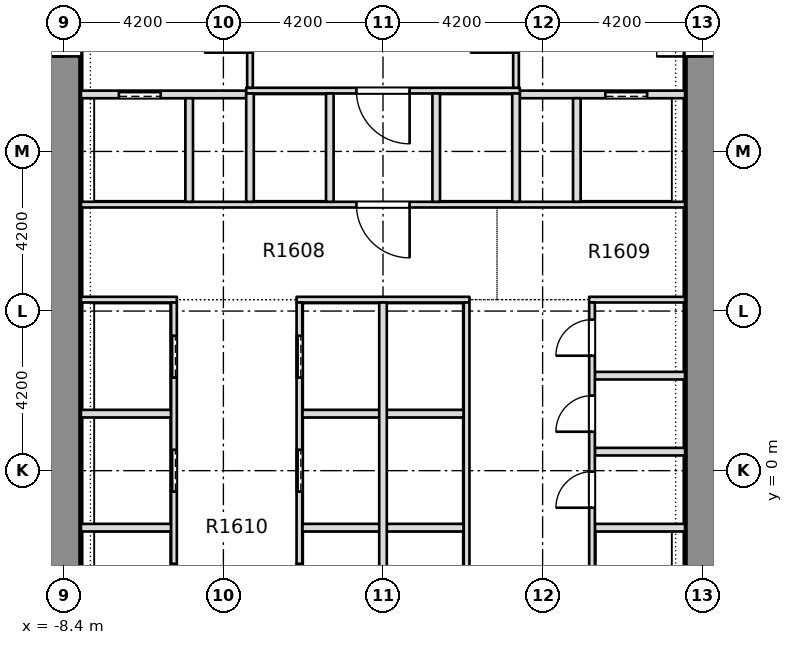
"""IFC4 building model, lengths in metres.
Left out: names, types, materials, properties, quantities, classifications, styles, units other than length and angle.
Written with IfcOpenShell. Run it as: python <this file> out.ifc"""

import sys

from ifc_helpers import new_model, si_unit, direction, frame, frame_2d, origin, place, context, subcontext, project, spatial, rectangle, extrude, element, fill, save


model = new_model("IFC4")
c1 = context("Model", 3, precision=1e-05, world=origin(), true_north=direction((0.0, 1.0)))
c2 = subcontext(c1, "Body", "Model", "MODEL_VIEW")
j1 = project(units=[si_unit("LENGTHUNIT", "METRE"), si_unit("PLANEANGLEUNIT", "RADIAN")], contexts=[c1])
p1 = place(None, origin())
s1 = spatial("IfcSite", under=j1, at=p1, CompositionType="ELEMENT")
p2 = place(p1, origin())
s2 = spatial("IfcBuilding", under=s1, at=p2, CompositionType="ELEMENT")
p3 = place(p2, frame((0.0, 0.0, 69.0)))
s3 = spatial("IfcBuildingStorey", under=s2, at=p3, CompositionType="ELEMENT", Elevation=69.0)
p4 = place(p3, frame((-8.4, -7.5, -0.32), z_axis=(0.0, 0.0, 1.0), x_axis=(0.0, 1.0, 0.0)))
e1 = element("IfcWall", 1, at=p4, inside=s3, PredefinedType="SHEAR", context=c2, shape_type="SweptSolid", body=[
    extrude(rectangle(XDim=28.35, YDim=0.9, at=frame_2d((14.175, 0.0))), origin(), (0.0, 0.0, 1.0), 3.45),
])
p5 = place(p4, frame((18.4, 0.0, 0.32)))
e2 = element("IfcOpeningElement", 2, at=p5, cuts=e1, PredefinedType="OPENING", context=c2, shape_type="SweptSolid", body=[
    extrude(rectangle(XDim=1.2, YDim=2.1, at=frame_2d((0.6, 1.05))), frame((0.0, 0.46, 0.0), z_axis=(0.0, -1.0, 0.0), x_axis=(1.0, 0.0, 0.0)), (0.0, 0.0, 1.0), 0.92),
])
p6 = place(p3, frame((8.4, -7.5, -0.32), z_axis=(0.0, 0.0, 1.0), x_axis=(0.0, 1.0, 0.0)))
e3 = element("IfcWall", 3, at=p6, inside=s3, PredefinedType="SHEAR", context=c2, shape_type="SweptSolid", body=[
    extrude(rectangle(XDim=28.35, YDim=0.9, at=frame_2d((14.175, 0.0))), origin(), (0.0, 0.0, 1.0), 3.45),
])
p7 = place(p6, frame((18.4, 0.0, 0.32)))
e4 = element("IfcOpeningElement", 4, at=p7, cuts=e3, PredefinedType="OPENING", context=c2, shape_type="SweptSolid", body=[
    extrude(rectangle(XDim=1.2, YDim=2.1, at=frame_2d((0.6, 1.05))), frame((0.0, 0.46, 0.0), z_axis=(0.0, -1.0, 0.0), x_axis=(1.0, 0.0, 0.0)), (0.0, 0.0, 1.0), 0.92),
])
p8 = place(p3, frame((-7.949, -1.5, 0.0), z_axis=(0.0, 0.0, 1.0), x_axis=(1.0, 0.0, 0.0)))
e5 = element("IfcWall", 5, at=p8, inside=s3, PredefinedType="PARTITIONING", context=c2, shape_type="SweptSolid", body=[
    extrude(rectangle(XDim=2.374, YDim=0.2, at=frame_2d((1.187, 0.0))), origin(), (0.0, 0.0, 1.0), 3.13),
])
p9 = place(p3, frame((-2.125, -1.5, 0.0), z_axis=(0.0, 0.0, 1.0), x_axis=(1.0, 0.0, 0.0)))
e6 = element("IfcWall", 6, at=p9, inside=s3, PredefinedType="PARTITIONING", context=c2, shape_type="SweptSolid", body=[
    extrude(rectangle(XDim=4.25, YDim=0.2, at=frame_2d((2.125, 0.0))), origin(), (0.0, 0.0, 1.0), 3.13),
])
for number, where, z_axis, x_axis in (
    (7, (5.575, -1.5, 0.0), (0.0, 0.0, 1.0), (1.0, 0.0, 0.0)),
    (8, (5.575, 0.5, 0.0), (0.0, 0.0, 1.0), (1.0, 0.0, 0.0)),
    (9, (-7.949, 1.5, 0.0), (0.0, 0.0, 1.0), (1.0, 0.0, 0.0)),
):
    element("IfcWall", number, at=place(p3, frame(where, z_axis=z_axis, x_axis=x_axis)), inside=s3, PredefinedType="PARTITIONING", context=c2, shape_type="SweptSolid", body=[
        extrude(rectangle(XDim=2.374, YDim=0.2, at=frame_2d((1.187, 0.0))), origin(), (0.0, 0.0, 1.0), 3.13),
    ])
p10 = place(p3, frame((-2.125, 1.5, 0.0), z_axis=(0.0, 0.0, 1.0), x_axis=(1.0, 0.0, 0.0)))
e10 = element("IfcWall", 10, at=p10, inside=s3, PredefinedType="PARTITIONING", context=c2, shape_type="SweptSolid", body=[
    extrude(rectangle(XDim=4.25, YDim=0.2, at=frame_2d((2.125, 0.0))), origin(), (0.0, 0.0, 1.0), 3.13),
])
p11 = place(p3, frame((5.575, 2.5, 0.0), z_axis=(0.0, 0.0, 1.0), x_axis=(1.0, 0.0, 0.0)))
e11 = element("IfcWall", 11, at=p11, inside=s3, PredefinedType="PARTITIONING", context=c2, shape_type="SweptSolid", body=[
    extrude(rectangle(XDim=2.374, YDim=0.2, at=frame_2d((1.187, 0.0))), origin(), (0.0, 0.0, 1.0), 3.13),
])
p12 = place(p3, frame((-7.949, 4.5, 0.0), z_axis=(0.0, 0.0, 1.0), x_axis=(1.0, 0.0, 0.0)))
e12 = element("IfcWall", 12, at=p12, inside=s3, PredefinedType="PARTITIONING", context=c2, shape_type="SweptSolid", body=[
    extrude(rectangle(XDim=2.524, YDim=0.15, at=frame_2d((1.262, 0.0))), origin(), (0.0, 0.0, 1.0), 3.13),
])
p13 = place(p3, frame((-2.275, 4.5, 0.0), z_axis=(0.0, 0.0, 1.0), x_axis=(1.0, 0.0, 0.0)))
e13 = element("IfcWall", 13, at=p13, inside=s3, PredefinedType="PARTITIONING", context=c2, shape_type="SweptSolid", body=[
    extrude(rectangle(XDim=4.55, YDim=0.15, at=frame_2d((2.275, 0.0))), origin(), (0.0, 0.0, 1.0), 3.13),
])
p14 = place(p3, frame((5.425, 4.5, 0.0), z_axis=(0.0, 0.0, 1.0), x_axis=(1.0, 0.0, 0.0)))
e14 = element("IfcWall", 14, at=p14, inside=s3, PredefinedType="PARTITIONING", context=c2, shape_type="SweptSolid", body=[
    extrude(rectangle(XDim=2.524, YDim=0.15, at=frame_2d((1.262, 0.0))), origin(), (0.0, 0.0, 1.0), 3.13),
])
p15 = place(p3, frame((-7.949, 7.0, 0.0), z_axis=(0.0, 0.0, 1.0), x_axis=(1.0, 0.0, 0.0)))
e15 = element("IfcWall", 15, at=p15, inside=s3, PredefinedType="PARTITIONING", context=c2, shape_type="SweptSolid", body=[
    extrude(rectangle(XDim=15.898, YDim=0.15, at=frame_2d((7.949, 0.0))), origin(), (0.0, 0.0, 1.0), 3.13),
])
p16 = place(p15, frame((7.249, 0.0, 0.0)))
e16 = element("IfcOpeningElement", 16, at=p16, cuts=e15, PredefinedType="OPENING", context=c2, shape_type="SweptSolid", body=[
    extrude(rectangle(XDim=1.4, YDim=2.1, at=frame_2d((0.7, 1.05))), frame((0.0, 0.085, 0.0), z_axis=(0.0, -1.0, 0.0), x_axis=(1.0, 0.0, 0.0)), (0.0, 0.0, 1.0), 0.17),
])
p17 = place(p3, frame((-7.949, 9.9, 0.0), z_axis=(0.0, 0.0, 1.0), x_axis=(1.0, 0.0, 0.0)))
e17 = element("IfcWall", 17, at=p17, inside=s3, PredefinedType="PARTITIONING", context=c2, shape_type="SweptSolid", body=[
    extrude(rectangle(XDim=4.349, YDim=0.2, at=frame_2d((2.174, 0.0))), origin(), (0.0, 0.0, 1.0), 3.13),
])
p18 = place(p17, frame((0.999, 0.0, 0.0)))
e18 = element("IfcOpeningElement", 18, at=p18, cuts=e17, PredefinedType="OPENING", context=c2, shape_type="SweptSolid", body=[
    extrude(rectangle(XDim=1.1, YDim=2.1, at=frame_2d((0.55, 1.05))), frame((0.0, 0.11, 0.0), z_axis=(0.0, -1.0, 0.0), x_axis=(1.0, 0.0, 0.0)), (0.0, 0.0, 1.0), 0.22),
])
p19 = place(p3, frame((3.6, 9.9, 0.0), z_axis=(0.0, 0.0, 1.0), x_axis=(1.0, 0.0, 0.0)))
e19 = element("IfcWall", 19, at=p19, inside=s3, PredefinedType="PARTITIONING", context=c2, shape_type="SweptSolid", body=[
    extrude(rectangle(XDim=4.349, YDim=0.2, at=frame_2d((2.174, 0.0))), origin(), (0.0, 0.0, 1.0), 3.13),
])
p20 = place(p19, frame((2.25, 0.0, 0.0)))
e20 = element("IfcOpeningElement", 20, at=p20, cuts=e19, PredefinedType="OPENING", context=c2, shape_type="SweptSolid", body=[
    extrude(rectangle(XDim=1.1, YDim=2.1, at=frame_2d((0.55, 1.05))), frame((0.0, 0.11, 0.0), z_axis=(0.0, -1.0, 0.0), x_axis=(1.0, 0.0, 0.0)), (0.0, 0.0, 1.0), 0.22),
])
p21 = place(p3, frame((-3.6, 10.0, 0.0), z_axis=(0.0, 0.0, 1.0), x_axis=(1.0, 0.0, 0.0)))
e21 = element("IfcWall", 21, at=p21, inside=s3, PredefinedType="PARTITIONING", context=c2, shape_type="SweptSolid", body=[
    extrude(rectangle(XDim=7.2, YDim=0.15, at=frame_2d((3.6, 0.0))), origin(), (0.0, 0.0, 1.0), 3.13),
])
p22 = place(p21, frame((2.9, 0.0, 0.0)))
e22 = element("IfcOpeningElement", 22, at=p22, cuts=e21, PredefinedType="OPENING", context=c2, shape_type="SweptSolid", body=[
    extrude(rectangle(XDim=1.4, YDim=2.1, at=frame_2d((0.7, 1.05))), frame((0.0, 0.085, 0.0), z_axis=(0.0, -1.0, 0.0), x_axis=(1.0, 0.0, 0.0)), (0.0, 0.0, 1.0), 0.17),
])
p23 = place(p3, frame((-5.5, -7.499, 0.0), z_axis=(0.0, 0.0, 1.0), x_axis=(0.0, 1.0, 0.0)))
e23 = element("IfcWall", 23, at=p23, inside=s3, PredefinedType="PARTITIONING", context=c2, shape_type="SweptSolid", body=[
    extrude(rectangle(XDim=11.924, YDim=0.15, at=frame_2d((5.962, 0.0))), origin(), (0.0, 0.0, 1.0), 3.13),
])
p24 = place(p23, frame((0.949, 0.0, 0.0)))
e24 = element("IfcOpeningElement", 24, at=p24, cuts=e23, PredefinedType="OPENING", context=c2, shape_type="SweptSolid", body=[
    extrude(rectangle(XDim=1.1, YDim=2.1, at=frame_2d((0.55, 1.05))), frame((0.0, 0.085, 0.0), z_axis=(0.0, -1.0, 0.0), x_axis=(1.0, 0.0, 0.0)), (0.0, 0.0, 1.0), 0.17),
])
p25 = place(p23, frame((3.949, 0.0, 0.0)))
e25 = element("IfcOpeningElement", 25, at=p25, cuts=e23, PredefinedType="OPENING", context=c2, shape_type="SweptSolid", body=[
    extrude(rectangle(XDim=1.1, YDim=2.1, at=frame_2d((0.55, 1.05))), frame((0.0, 0.085, 0.0), z_axis=(0.0, -1.0, 0.0), x_axis=(1.0, 0.0, 0.0)), (0.0, 0.0, 1.0), 0.17),
])
p26 = place(p23, frame((6.949, 0.0, 0.0)))
e26 = element("IfcOpeningElement", 26, at=p26, cuts=e23, PredefinedType="OPENING", context=c2, shape_type="SweptSolid", body=[
    extrude(rectangle(XDim=1.1, YDim=2.1, at=frame_2d((0.55, 1.05))), frame((0.0, 0.085, 0.0), z_axis=(0.0, -1.0, 0.0), x_axis=(1.0, 0.0, 0.0)), (0.0, 0.0, 1.0), 0.17),
])
p27 = place(p23, frame((9.949, 0.0, 0.0)))
e27 = element("IfcOpeningElement", 27, at=p27, cuts=e23, PredefinedType="OPENING", context=c2, shape_type="SweptSolid", body=[
    extrude(rectangle(XDim=1.1, YDim=2.1, at=frame_2d((0.55, 1.05))), frame((0.0, 0.085, 0.0), z_axis=(0.0, -1.0, 0.0), x_axis=(1.0, 0.0, 0.0)), (0.0, 0.0, 1.0), 0.17),
])
p28 = place(p3, frame((-5.1, 7.075, 0.0), z_axis=(0.0, 0.0, 1.0), x_axis=(0.0, 1.0, 0.0)))
e28 = element("IfcWall", 28, at=p28, inside=s3, PredefinedType="PARTITIONING", context=c2, shape_type="SweptSolid", body=[
    extrude(rectangle(XDim=2.725, YDim=0.2, at=frame_2d((1.363, 0.0))), origin(), (0.0, 0.0, 1.0), 3.13),
])
p29 = place(p3, frame((-3.5, 7.075, 0.0), z_axis=(0.0, 0.0, 1.0), x_axis=(0.0, 1.0, 0.0)))
e29 = element("IfcWall", 29, at=p29, inside=s3, PredefinedType="PARTITIONING", context=c2, shape_type="SweptSolid", body=[
    extrude(rectangle(XDim=2.85, YDim=0.2, at=frame_2d((1.425, 0.0))), origin(), (0.0, 0.0, 1.0), 3.13),
])
p30 = place(p3, frame((-3.5, 10.075, 0.0), z_axis=(0.0, 0.0, 1.0), x_axis=(0.0, 1.0, 0.0)))
e30 = element("IfcWall", 30, at=p30, inside=s3, PredefinedType="PARTITIONING", context=c2, shape_type="SweptSolid", body=[
    extrude(rectangle(XDim=3.075, YDim=0.15, at=frame_2d((1.538, 0.0))), origin(), (0.0, 0.0, 1.0), 3.13),
])
p31 = place(p30, frame((0.925, 0.0, 0.0)))
e31 = element("IfcOpeningElement", 31, at=p31, cuts=e30, PredefinedType="OPENING", context=c2, shape_type="SweptSolid", body=[
    extrude(rectangle(XDim=1.2, YDim=2.1, at=frame_2d((0.6, 1.05))), frame((0.0, 0.085, 0.0), z_axis=(0.0, -1.0, 0.0), x_axis=(1.0, 0.0, 0.0)), (0.0, 0.0, 1.0), 0.17),
])
p32 = place(p3, frame((-2.2, -7.499, 0.0), z_axis=(0.0, 0.0, 1.0), x_axis=(0.0, 1.0, 0.0)))
e32 = element("IfcWall", 32, at=p32, inside=s3, PredefinedType="PARTITIONING", context=c2, shape_type="SweptSolid", body=[
    extrude(rectangle(XDim=11.924, YDim=0.15, at=frame_2d((5.962, 0.0))), origin(), (0.0, 0.0, 1.0), 3.13),
])
p33 = place(p32, frame((0.949, 0.0, 0.0)))
e33 = element("IfcOpeningElement", 33, at=p33, cuts=e32, PredefinedType="OPENING", context=c2, shape_type="SweptSolid", body=[
    extrude(rectangle(XDim=1.1, YDim=2.1, at=frame_2d((0.55, 1.05))), frame((0.0, 0.085, 0.0), z_axis=(0.0, -1.0, 0.0), x_axis=(1.0, 0.0, 0.0)), (0.0, 0.0, 1.0), 0.17),
])
p34 = place(p32, frame((3.949, 0.0, 0.0)))
e34 = element("IfcOpeningElement", 34, at=p34, cuts=e32, PredefinedType="OPENING", context=c2, shape_type="SweptSolid", body=[
    extrude(rectangle(XDim=1.1, YDim=2.1, at=frame_2d((0.55, 1.05))), frame((0.0, 0.085, 0.0), z_axis=(0.0, -1.0, 0.0), x_axis=(1.0, 0.0, 0.0)), (0.0, 0.0, 1.0), 0.17),
])
p35 = place(p32, frame((6.949, 0.0, 0.0)))
e35 = element("IfcOpeningElement", 35, at=p35, cuts=e32, PredefinedType="OPENING", context=c2, shape_type="SweptSolid", body=[
    extrude(rectangle(XDim=1.1, YDim=2.1, at=frame_2d((0.55, 1.05))), frame((0.0, 0.085, 0.0), z_axis=(0.0, -1.0, 0.0), x_axis=(1.0, 0.0, 0.0)), (0.0, 0.0, 1.0), 0.17),
])
p36 = place(p32, frame((9.949, 0.0, 0.0)))
e36 = element("IfcOpeningElement", 36, at=p36, cuts=e32, PredefinedType="OPENING", context=c2, shape_type="SweptSolid", body=[
    extrude(rectangle(XDim=1.1, YDim=2.1, at=frame_2d((0.55, 1.05))), frame((0.0, 0.085, 0.0), z_axis=(0.0, -1.0, 0.0), x_axis=(1.0, 0.0, 0.0)), (0.0, 0.0, 1.0), 0.17),
])
p37 = place(p3, frame((-1.4, 7.075, 0.0), z_axis=(0.0, 0.0, 1.0), x_axis=(0.0, 1.0, 0.0)))
e37 = element("IfcWall", 37, at=p37, inside=s3, PredefinedType="PARTITIONING", context=c2, shape_type="SweptSolid", body=[
    extrude(rectangle(XDim=2.85, YDim=0.2, at=frame_2d((1.425, 0.0))), origin(), (0.0, 0.0, 1.0), 3.13),
])
p38 = place(p3, frame((0.0, -7.499, 0.0), z_axis=(0.0, 0.0, 1.0), x_axis=(0.0, 1.0, 0.0)))
e38 = element("IfcWall", 38, at=p38, inside=s3, PredefinedType="PARTITIONING", context=c2, shape_type="SweptSolid", body=[
    extrude(rectangle(XDim=11.924, YDim=0.2, at=frame_2d((5.962, 0.0))), origin(), (0.0, 0.0, 1.0), 3.13),
])
p39 = place(p3, frame((1.4, 7.075, 0.0), z_axis=(0.0, 0.0, 1.0), x_axis=(0.0, 1.0, 0.0)))
e39 = element("IfcWall", 39, at=p39, inside=s3, PredefinedType="PARTITIONING", context=c2, shape_type="SweptSolid", body=[
    extrude(rectangle(XDim=2.85, YDim=0.2, at=frame_2d((1.425, 0.0))), origin(), (0.0, 0.0, 1.0), 3.13),
])
p40 = place(p3, frame((2.2, -7.499, 0.0), z_axis=(0.0, 0.0, 1.0), x_axis=(0.0, 1.0, 0.0)))
e40 = element("IfcWall", 40, at=p40, inside=s3, PredefinedType="PARTITIONING", context=c2, shape_type="SweptSolid", body=[
    extrude(rectangle(XDim=11.924, YDim=0.15, at=frame_2d((5.962, 0.0))), origin(), (0.0, 0.0, 1.0), 3.13),
])
p41 = place(p3, frame((3.5, 7.075, 0.0), z_axis=(0.0, 0.0, 1.0), x_axis=(0.0, 1.0, 0.0)))
e41 = element("IfcWall", 41, at=p41, inside=s3, PredefinedType="PARTITIONING", context=c2, shape_type="SweptSolid", body=[
    extrude(rectangle(XDim=2.85, YDim=0.2, at=frame_2d((1.425, 0.0))), origin(), (0.0, 0.0, 1.0), 3.13),
])
p42 = place(p3, frame((3.5, 10.075, 0.0), z_axis=(0.0, 0.0, 1.0), x_axis=(0.0, 1.0, 0.0)))
e42 = element("IfcWall", 42, at=p42, inside=s3, PredefinedType="PARTITIONING", context=c2, shape_type="SweptSolid", body=[
    extrude(rectangle(XDim=3.075, YDim=0.15, at=frame_2d((1.538, 0.0))), origin(), (0.0, 0.0, 1.0), 3.13),
])
p43 = place(p42, frame((0.925, 0.0, 0.0)))
e43 = element("IfcOpeningElement", 43, at=p43, cuts=e42, PredefinedType="OPENING", context=c2, shape_type="SweptSolid", body=[
    extrude(rectangle(XDim=1.2, YDim=2.1, at=frame_2d((0.6, 1.05))), frame((0.0, 0.085, 0.0), z_axis=(0.0, -1.0, 0.0), x_axis=(1.0, 0.0, 0.0)), (0.0, 0.0, 1.0), 0.17),
])
p44 = place(p3, frame((5.1, 7.075, 0.0), z_axis=(0.0, 0.0, 1.0), x_axis=(0.0, 1.0, 0.0)))
e44 = element("IfcWall", 44, at=p44, inside=s3, PredefinedType="PARTITIONING", context=c2, shape_type="SweptSolid", body=[
    extrude(rectangle(XDim=2.725, YDim=0.2, at=frame_2d((1.363, 0.0))), origin(), (0.0, 0.0, 1.0), 3.13),
])
p45 = place(p3, frame((5.5, -7.499, 0.0), z_axis=(0.0, 0.0, 1.0), x_axis=(0.0, 1.0, 0.0)))
e45 = element("IfcWall", 45, at=p45, inside=s3, PredefinedType="PARTITIONING", context=c2, shape_type="SweptSolid", body=[
    extrude(rectangle(XDim=11.924, YDim=0.15, at=frame_2d((5.962, 0.0))), origin(), (0.0, 0.0, 1.0), 3.13),
])
p46 = place(p45, frame((6.524, 0.0, 0.0)))
e46 = element("IfcOpeningElement", 46, at=p46, cuts=e45, PredefinedType="OPENING", context=c2, shape_type="SweptSolid", body=[
    extrude(rectangle(XDim=0.95, YDim=2.1, at=frame_2d((0.475, 1.05))), frame((0.0, 0.085, 0.0), z_axis=(0.0, -1.0, 0.0), x_axis=(1.0, 0.0, 0.0)), (0.0, 0.0, 1.0), 0.17),
])
p47 = place(p45, frame((8.524, 0.0, 0.0)))
e47 = element("IfcOpeningElement", 47, at=p47, cuts=e45, PredefinedType="OPENING", context=c2, shape_type="SweptSolid", body=[
    extrude(rectangle(XDim=0.95, YDim=2.1, at=frame_2d((0.475, 1.05))), frame((0.0, 0.085, 0.0), z_axis=(0.0, -1.0, 0.0), x_axis=(1.0, 0.0, 0.0)), (0.0, 0.0, 1.0), 0.17),
])
p48 = place(p45, frame((10.524, 0.0, 0.0)))
e48 = element("IfcOpeningElement", 48, at=p48, cuts=e45, PredefinedType="OPENING", context=c2, shape_type="SweptSolid", body=[
    extrude(rectangle(XDim=0.95, YDim=2.1, at=frame_2d((0.475, 1.05))), frame((0.0, 0.085, 0.0), z_axis=(0.0, -1.0, 0.0), x_axis=(1.0, 0.0, 0.0)), (0.0, 0.0, 1.0), 0.17),
])
p49 = place(p25, origin())
e49 = element("IfcDoor", 49, at=p49, inside=s3, OperationType="SLIDING_TO_RIGHT", PredefinedType="DOOR", context=c2, shape_type="SweptSolid", body=[
    extrude(rectangle(XDim=1.1, YDim=2.1, at=frame_2d((0.55, 1.05))), frame((0.0, 0.025, 0.0), z_axis=(0.0, -1.0, 0.0), x_axis=(1.0, 0.0, 0.0)), (0.0, 0.0, 1.0), 0.05),
])
fill(e25, e49)
p50 = place(p26, origin())
e50 = element("IfcDoor", 50, at=p50, inside=s3, OperationType="SLIDING_TO_RIGHT", PredefinedType="DOOR", context=c2, shape_type="SweptSolid", body=[
    extrude(rectangle(XDim=1.1, YDim=2.1, at=frame_2d((0.55, 1.05))), frame((0.0, 0.025, 0.0), z_axis=(0.0, -1.0, 0.0), x_axis=(1.0, 0.0, 0.0)), (0.0, 0.0, 1.0), 0.05),
])
fill(e26, e50)
p51 = place(p27, origin())
e51 = element("IfcDoor", 51, at=p51, inside=s3, OperationType="SLIDING_TO_RIGHT", PredefinedType="DOOR", context=c2, shape_type="SweptSolid", body=[
    extrude(rectangle(XDim=1.1, YDim=2.1, at=frame_2d((0.55, 1.05))), frame((0.0, 0.025, 0.0), z_axis=(0.0, -1.0, 0.0), x_axis=(1.0, 0.0, 0.0)), (0.0, 0.0, 1.0), 0.05),
])
fill(e27, e51)
p52 = place(p34, origin())
e52 = element("IfcDoor", 52, at=p52, inside=s3, OperationType="SLIDING_TO_RIGHT", PredefinedType="DOOR", context=c2, shape_type="SweptSolid", body=[
    extrude(rectangle(XDim=1.1, YDim=2.1, at=frame_2d((0.55, 1.05))), frame((0.0, 0.025, 0.0), z_axis=(0.0, -1.0, 0.0), x_axis=(1.0, 0.0, 0.0)), (0.0, 0.0, 1.0), 0.05),
])
fill(e34, e52)
p53 = place(p35, origin())
e53 = element("IfcDoor", 53, at=p53, inside=s3, OperationType="SLIDING_TO_RIGHT", PredefinedType="DOOR", context=c2, shape_type="SweptSolid", body=[
    extrude(rectangle(XDim=1.1, YDim=2.1, at=frame_2d((0.55, 1.05))), frame((0.0, 0.025, 0.0), z_axis=(0.0, -1.0, 0.0), x_axis=(1.0, 0.0, 0.0)), (0.0, 0.0, 1.0), 0.05),
])
fill(e35, e53)
p54 = place(p36, origin())
e54 = element("IfcDoor", 54, at=p54, inside=s3, OperationType="SLIDING_TO_RIGHT", PredefinedType="DOOR", context=c2, shape_type="SweptSolid", body=[
    extrude(rectangle(XDim=1.1, YDim=2.1, at=frame_2d((0.55, 1.05))), frame((0.0, 0.025, 0.0), z_axis=(0.0, -1.0, 0.0), x_axis=(1.0, 0.0, 0.0)), (0.0, 0.0, 1.0), 0.05),
])
fill(e36, e54)
p55 = place(p46, origin())
e55 = element("IfcDoor", 55, at=p55, inside=s3, OperationType="SINGLE_SWING_RIGHT", PredefinedType="DOOR", context=c2, shape_type="SweptSolid", body=[
    extrude(rectangle(XDim=0.95, YDim=2.1, at=frame_2d((0.475, 1.05))), frame((0.0, 0.025, 0.0), z_axis=(0.0, -1.0, 0.0), x_axis=(1.0, 0.0, 0.0)), (0.0, 0.0, 1.0), 0.05),
])
fill(e46, e55)
p56 = place(p47, origin())
e56 = element("IfcDoor", 56, at=p56, inside=s3, OperationType="SINGLE_SWING_LEFT", PredefinedType="DOOR", context=c2, shape_type="SweptSolid", body=[
    extrude(rectangle(XDim=0.95, YDim=2.1, at=frame_2d((0.475, 1.05))), frame((0.0, 0.025, 0.0), z_axis=(0.0, -1.0, 0.0), x_axis=(1.0, 0.0, 0.0)), (0.0, 0.0, 1.0), 0.05),
])
fill(e47, e56)
p57 = place(p48, origin())
e57 = element("IfcDoor", 57, at=p57, inside=s3, OperationType="SINGLE_SWING_RIGHT", PredefinedType="DOOR", context=c2, shape_type="SweptSolid", body=[
    extrude(rectangle(XDim=0.95, YDim=2.1, at=frame_2d((0.475, 1.05))), frame((0.0, 0.025, 0.0), z_axis=(0.0, -1.0, 0.0), x_axis=(1.0, 0.0, 0.0)), (0.0, 0.0, 1.0), 0.05),
])
fill(e48, e57)
p58 = place(p18, origin())
e58 = element("IfcDoor", 58, at=p58, inside=s3, OperationType="SLIDING_TO_RIGHT", PredefinedType="DOOR", context=c2, shape_type="SweptSolid", body=[
    extrude(rectangle(XDim=1.1, YDim=2.1, at=frame_2d((0.55, 1.05))), frame((0.0, 0.025, 0.0), z_axis=(0.0, -1.0, 0.0), x_axis=(1.0, 0.0, 0.0)), (0.0, 0.0, 1.0), 0.05),
])
fill(e18, e58)
p59 = place(p20, origin())
e59 = element("IfcDoor", 59, at=p59, inside=s3, OperationType="SLIDING_TO_LEFT", PredefinedType="DOOR", context=c2, shape_type="SweptSolid", body=[
    extrude(rectangle(XDim=1.1, YDim=2.1, at=frame_2d((0.55, 1.05))), frame((0.0, 0.025, 0.0), z_axis=(0.0, -1.0, 0.0), x_axis=(1.0, 0.0, 0.0)), (0.0, 0.0, 1.0), 0.05),
])
fill(e20, e59)
p60 = place(p16, origin())
e60 = element("IfcDoor", 60, at=p60, inside=s3, OperationType="SINGLE_SWING_RIGHT", PredefinedType="DOOR", context=c2, shape_type="SweptSolid", body=[
    extrude(rectangle(XDim=1.4, YDim=2.1, at=frame_2d((0.7, 1.05))), frame((0.0, 0.025, 0.0), z_axis=(0.0, -1.0, 0.0), x_axis=(1.0, 0.0, 0.0)), (0.0, 0.0, 1.0), 0.05),
])
fill(e16, e60)
p61 = place(p22, origin())
e61 = element("IfcDoor", 61, at=p61, inside=s3, OperationType="SINGLE_SWING_RIGHT", PredefinedType="DOOR", context=c2, shape_type="SweptSolid", body=[
    extrude(rectangle(XDim=1.4, YDim=2.1, at=frame_2d((0.7, 1.05))), frame((0.0, 0.025, 0.0), z_axis=(0.0, -1.0, 0.0), x_axis=(1.0, 0.0, 0.0)), (0.0, 0.0, 1.0), 0.05),
])
fill(e22, e61)
p62 = place(p5, origin())
e62 = element("IfcDoor", 62, at=p62, inside=s3, OperationType="SINGLE_SWING_LEFT", PredefinedType="DOOR", context=c2, shape_type="SweptSolid", body=[
    extrude(rectangle(XDim=1.2, YDim=2.1, at=frame_2d((0.6, 1.05))), frame((0.0, 0.025, 0.0), z_axis=(0.0, -1.0, 0.0), x_axis=(1.0, 0.0, 0.0)), (0.0, 0.0, 1.0), 0.05),
])
fill(e2, e62)
p63 = place(p7, origin())
e63 = element("IfcDoor", 63, at=p63, inside=s3, OperationType="SINGLE_SWING_LEFT", PredefinedType="DOOR", context=c2, shape_type="SweptSolid", body=[
    extrude(rectangle(XDim=1.2, YDim=2.1, at=frame_2d((0.6, 1.05))), frame((0.0, 0.025, 0.0), z_axis=(0.0, -1.0, 0.0), x_axis=(1.0, 0.0, 0.0)), (0.0, 0.0, 1.0), 0.05),
])
fill(e4, e63)
save(model, sys.argv[1])
